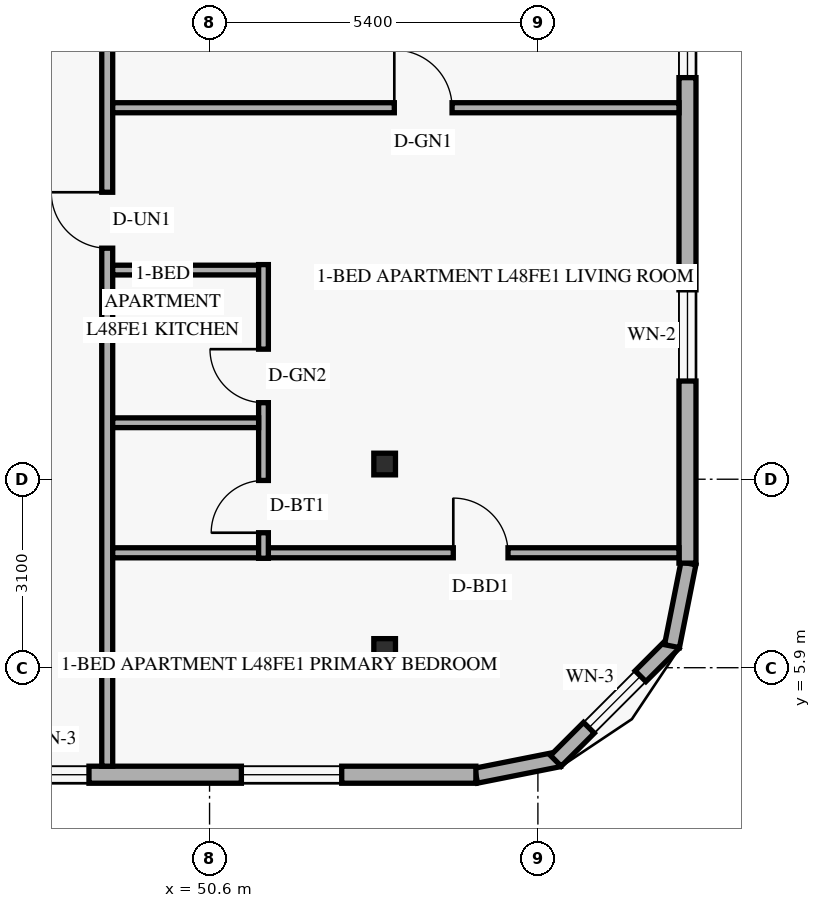
"""IFC4 building model, lengths in metres.
Left out: names, types, materials, properties, quantities, classifications, styles, units other than length and angle.
Written with IfcOpenShell. Run it as: python <this file> out.ifc"""

import sys

from ifc_helpers import new_model, si_unit, direction, frame, frame_2d, origin, origin_2d, place, context, subcontext, project, spatial, rectangle, hollow_rectangle, extrude, element, fill, save


model = new_model("IFC4")
c1 = context("Model", 3, precision=1e-05, world=origin(), true_north=direction((0.0, 1.0)))
c2 = subcontext(c1, "Body", "Model", "MODEL_VIEW")
j1 = project(units=[si_unit("LENGTHUNIT", "METRE"), si_unit("PLANEANGLEUNIT", "RADIAN")], contexts=[c1])
p1 = place(None, origin())
s1 = spatial("IfcSite", under=j1, at=p1, CompositionType="ELEMENT")
p2 = place(p1, origin())
s2 = spatial("IfcBuilding", under=s1, at=p2, CompositionType="ELEMENT")
p3 = place(p2, frame((0.0, 0.0, 184.8)))
s3 = spatial("IfcBuildingStorey", under=s2, at=p3, CompositionType="ELEMENT", Elevation=184.8)
for number, where, z_axis, x_axis in (
    (1, (53.375, 6.2, 0.0), (0.058, 0.0, 0.998), (0.0, 1.0, 0.0)),
    (2, (53.375, 9.25, 0.0), (0.058, 0.0, 0.998), (0.0, 1.0, 0.0)),
):
    element("IfcColumn", number, at=place(p3, frame(where, z_axis=z_axis, x_axis=x_axis)), inside=s3, PredefinedType="COLUMN", context=c2, shape_type="SweptSolid", body=[
        extrude(hollow_rectangle(XDim=0.356, YDim=0.356, WallThickness=0.016, at=origin_2d()), origin(), (0.0, 0.0, 1.0), 3.606),
    ])
p4 = place(p3, frame((54.983, 4.124, 0.0), z_axis=(0.0, 0.0, 1.0), x_axis=(0.980809899341, 0.19496651342, 0.0)))
e3 = element("IfcWall", 3, at=p4, inside=s3, PredefinedType="SOLIDWALL", context=c2, shape_type="SweptSolid", body=[
    extrude(rectangle(XDim=1.389, YDim=0.25, at=frame_2d((0.694, 0.0))), origin(), (0.0, 0.0, 1.0), 3.36),
])
p5 = place(p3, frame((56.295, 4.368, 0.0), z_axis=(0.0, 0.0, 1.0), x_axis=(0.707106781187, 0.707106781187, 0.0)))
e4 = element("IfcWall", 4, at=p5, inside=s3, PredefinedType="SOLIDWALL", context=c2, shape_type="SweptSolid", body=[
    extrude(rectangle(XDim=2.739, YDim=0.25, at=frame_2d((1.37, 0.0))), origin(), (0.0, 0.0, 1.0), 3.36),
])
p6 = place(p5, frame((0.77, 0.0, 0.85)))
e5 = element("IfcOpeningElement", 5, at=p6, cuts=e4, PredefinedType="OPENING", context=c2, shape_type="SweptSolid", body=[
    extrude(rectangle(XDim=1.2, YDim=1.5, at=frame_2d((0.6, 0.75))), frame((0.0, 0.135, 0.0), z_axis=(0.0, -1.0, 0.0), x_axis=(1.0, 0.0, 0.0)), (0.0, 0.0, 1.0), 0.27),
])
p7 = place(p3, frame((58.205, 6.254, 0.0), z_axis=(0.0, 0.0, 1.0), x_axis=(0.19496651342, 0.980809899341, 0.0)))
e6 = element("IfcWall", 6, at=p7, inside=s3, PredefinedType="SOLIDWALL", context=c2, shape_type="SweptSolid", body=[
    extrude(rectangle(XDim=1.389, YDim=0.25, at=frame_2d((0.694, 0.0))), origin(), (0.0, 0.0, 1.0), 3.36),
])
p8 = place(p3, frame((21.22, 4.14, 0.0), z_axis=(0.0, 0.0, 1.0), x_axis=(1.0, 0.0, 0.0)))
e7 = element("IfcWall", 7, at=p8, inside=s3, PredefinedType="SOLIDWALL", context=c2, shape_type="SweptSolid", body=[
    extrude(rectangle(XDim=33.76, YDim=0.28, at=frame_2d((16.88, 0.0))), origin(), (0.0, 0.0, 1.0), 3.36),
])
p9 = place(p8, frame((2.33, 0.0, 0.85)))
e8 = element("IfcOpeningElement", 8, at=p9, cuts=e7, PredefinedType="OPENING", context=c2, shape_type="SweptSolid", body=[
    extrude(rectangle(XDim=1.65, YDim=1.6, at=frame_2d((0.825, 0.8))), frame((0.0, 0.15, 0.0), z_axis=(0.0, -1.0, 0.0), x_axis=(1.0, 0.0, 0.0)), (0.0, 0.0, 1.0), 0.3),
])
p10 = place(p8, frame((9.215, 0.0, 0.85)))
e9 = element("IfcOpeningElement", 9, at=p10, cuts=e7, PredefinedType="OPENING", context=c2, shape_type="SweptSolid", body=[
    extrude(rectangle(XDim=1.65, YDim=1.6, at=frame_2d((0.825, 0.8))), frame((0.0, 0.15, 0.0), z_axis=(0.0, -1.0, 0.0), x_axis=(1.0, 0.0, 0.0)), (0.0, 0.0, 1.0), 0.3),
])
p11 = place(p8, frame((14.64, 0.0, 0.85)))
e10 = element("IfcOpeningElement", 10, at=p11, cuts=e7, PredefinedType="OPENING", context=c2, shape_type="SweptSolid", body=[
    extrude(rectangle(XDim=1.65, YDim=1.6, at=frame_2d((0.825, 0.8))), frame((0.0, 0.15, 0.0), z_axis=(0.0, -1.0, 0.0), x_axis=(1.0, 0.0, 0.0)), (0.0, 0.0, 1.0), 0.3),
])
p12 = place(p8, frame((20.489, 0.0, 0.85)))
e11 = element("IfcOpeningElement", 11, at=p12, cuts=e7, PredefinedType="OPENING", context=c2, shape_type="SweptSolid", body=[
    extrude(rectangle(XDim=1.65, YDim=1.6, at=frame_2d((0.825, 0.8))), frame((0.0, 0.15, 0.0), z_axis=(0.0, -1.0, 0.0), x_axis=(1.0, 0.0, 0.0)), (0.0, 0.0, 1.0), 0.3),
])
p13 = place(p8, frame((26.197, 0.0, 0.85)))
e12 = element("IfcOpeningElement", 12, at=p13, cuts=e7, PredefinedType="OPENING", context=c2, shape_type="SweptSolid", body=[
    extrude(rectangle(XDim=1.2, YDim=1.5, at=frame_2d((0.6, 0.75))), frame((0.0, 0.15, 0.0), z_axis=(0.0, -1.0, 0.0), x_axis=(1.0, 0.0, 0.0)), (0.0, 0.0, 1.0), 0.3),
])
p14 = place(p8, frame((29.904, 0.0, 0.85)))
e13 = element("IfcOpeningElement", 13, at=p14, cuts=e7, PredefinedType="OPENING", context=c2, shape_type="SweptSolid", body=[
    extrude(rectangle(XDim=1.65, YDim=1.6, at=frame_2d((0.825, 0.8))), frame((0.0, 0.15, 0.0), z_axis=(0.0, -1.0, 0.0), x_axis=(1.0, 0.0, 0.0)), (0.0, 0.0, 1.0), 0.3),
])
p15 = place(p3, frame((58.46, 7.62, 0.0), z_axis=(0.0, 0.0, 1.0), x_axis=(0.0, 1.0, 0.0)))
e14 = element("IfcWall", 14, at=p15, inside=s3, PredefinedType="SOLIDWALL", context=c2, shape_type="SweptSolid", body=[
    extrude(rectangle(XDim=12.72, YDim=0.28, at=frame_2d((6.36, 0.0))), origin(), (0.0, 0.0, 1.0), 3.36),
])
p16 = place(p15, frame((2.995, 0.0, 0.85)))
e15 = element("IfcOpeningElement", 15, at=p16, cuts=e14, PredefinedType="OPENING", context=c2, shape_type="SweptSolid", body=[
    extrude(rectangle(XDim=1.5, YDim=1.55, at=frame_2d((0.75, 0.775))), frame((0.0, 0.15, 0.0), z_axis=(0.0, -1.0, 0.0), x_axis=(1.0, 0.0, 0.0)), (0.0, 0.0, 1.0), 0.3),
])
p17 = place(p15, frame((7.985, 0.0, 0.85)))
e16 = element("IfcOpeningElement", 16, at=p17, cuts=e14, PredefinedType="OPENING", context=c2, shape_type="SweptSolid", body=[
    extrude(rectangle(XDim=1.5, YDim=1.55, at=frame_2d((0.75, 0.775))), frame((0.0, 0.15, 0.0), z_axis=(0.0, -1.0, 0.0), x_axis=(1.0, 0.0, 0.0)), (0.0, 0.0, 1.0), 0.3),
])
p18 = place(p15, frame((10.6, 0.0, 0.85)))
e17 = element("IfcOpeningElement", 17, at=p18, cuts=e14, PredefinedType="OPENING", context=c2, shape_type="SweptSolid", body=[
    extrude(rectangle(XDim=1.5, YDim=1.55, at=frame_2d((0.75, 0.775))), frame((0.0, 0.15, 0.0), z_axis=(0.0, -1.0, 0.0), x_axis=(1.0, 0.0, 0.0)), (0.0, 0.0, 1.0), 0.3),
])
p19 = place(p3, frame((48.917, 4.28, 0.0), z_axis=(0.0, 0.0, 1.0), x_axis=(0.0, 1.0, 0.0)))
e18 = element("IfcWall", 18, at=p19, inside=s3, PredefinedType="STANDARD", context=c2, shape_type="SweptSolid", body=[
    extrude(rectangle(XDim=39.44, YDim=0.18, at=frame_2d((19.72, 0.0))), origin(), (0.0, 0.0, 1.0), 2.73),
])
p20 = place(p19, frame((8.52, 0.0, 0.0)))
e19 = element("IfcOpeningElement", 19, at=p20, cuts=e18, PredefinedType="OPENING", context=c2, shape_type="SweptSolid", body=[
    extrude(rectangle(XDim=0.92, YDim=2.15, at=frame_2d((0.46, 1.075))), frame((0.0, 0.1, 0.0), z_axis=(0.0, -1.0, 0.0), x_axis=(1.0, 0.0, 0.0)), (0.0, 0.0, 1.0), 0.2),
])
p21 = place(p19, frame((17.302, 0.0, 0.0)))
e20 = element("IfcOpeningElement", 20, at=p21, cuts=e18, PredefinedType="OPENING", context=c2, shape_type="SweptSolid", body=[
    extrude(rectangle(XDim=0.92, YDim=2.15, at=frame_2d((0.46, 1.075))), frame((0.0, 0.1, 0.0), z_axis=(0.0, -1.0, 0.0), x_axis=(1.0, 0.0, 0.0)), (0.0, 0.0, 1.0), 0.2),
])
p22 = place(p19, frame((29.923, 0.0, 0.0)))
e21 = element("IfcOpeningElement", 21, at=p22, cuts=e18, PredefinedType="OPENING", context=c2, shape_type="SweptSolid", body=[
    extrude(rectangle(XDim=0.92, YDim=2.15, at=frame_2d((0.46, 1.075))), frame((0.0, 0.1, 0.0), z_axis=(0.0, -1.0, 0.0), x_axis=(1.0, 0.0, 0.0)), (0.0, 0.0, 1.0), 0.2),
])
p23 = place(p3, frame((49.007, 7.79, 0.0), z_axis=(0.0, 0.0, 1.0), x_axis=(1.0, 0.0, 0.0)))
e22 = element("IfcWall", 22, at=p23, inside=s3, PredefinedType="PARTITIONING", context=c2, shape_type="SweptSolid", body=[
    extrude(rectangle(XDim=9.313, YDim=0.165, at=frame_2d((4.656, 0.0))), origin(), (0.0, 0.0, 1.0), 2.879),
])
p24 = place(p23, frame((5.602, 0.0, 0.0)))
e23 = element("IfcOpeningElement", 23, at=p24, cuts=e22, PredefinedType="OPENING", context=c2, shape_type="SweptSolid", body=[
    extrude(rectangle(XDim=0.9, YDim=2.14, at=frame_2d((0.45, 1.07))), frame((0.0, 0.093, 0.0), z_axis=(0.0, -1.0, 0.0), x_axis=(1.0, 0.0, 0.0)), (0.0, 0.0, 1.0), 0.185),
])
p25 = place(p3, frame((49.007, 12.44, 0.0), z_axis=(0.0, 0.0, 1.0), x_axis=(1.0, 0.0, 0.0)))
e24 = element("IfcWall", 24, at=p25, inside=s3, PredefinedType="PLUMBINGWALL", context=c2, shape_type="SweptSolid", body=[
    extrude(rectangle(XDim=2.56, YDim=0.16, at=frame_2d((1.28, 0.0))), origin(), (0.0, 0.0, 1.0), 3.36),
])
p26 = place(p3, frame((51.487, 7.7, 0.0), z_axis=(0.0, 0.0, 1.0), x_axis=(0.0, 1.0, 0.0)))
e25 = element("IfcWall", 25, at=p26, inside=s3, PredefinedType="PLUMBINGWALL", context=c2, shape_type="SweptSolid", body=[
    extrude(rectangle(XDim=4.83, YDim=0.16, at=frame_2d((2.415, 0.0))), origin(), (0.0, 0.0, 1.0), 2.73),
])
p27 = place(p26, frame((0.42, 0.0, 0.0)))
e26 = element("IfcOpeningElement", 26, at=p27, cuts=e25, PredefinedType="OPENING", context=c2, shape_type="SweptSolid", body=[
    extrude(rectangle(XDim=0.86, YDim=2.12, at=frame_2d((0.43, 1.06))), frame((0.0, 0.09, 0.0), z_axis=(0.0, -1.0, 0.0), x_axis=(1.0, 0.0, 0.0)), (0.0, 0.0, 1.0), 0.18),
])
p28 = place(p26, frame((2.559, 0.0, 0.0)))
e27 = element("IfcOpeningElement", 27, at=p28, cuts=e25, PredefinedType="OPENING", context=c2, shape_type="SweptSolid", body=[
    extrude(rectangle(XDim=0.88, YDim=2.12, at=frame_2d((0.44, 1.06))), frame((0.0, 0.09, 0.0), z_axis=(0.0, -1.0, 0.0), x_axis=(1.0, 0.0, 0.0)), (0.0, 0.0, 1.0), 0.18),
])
p29 = place(p3, frame((49.007, 9.929, 0.0), z_axis=(0.0, 0.0, 1.0), x_axis=(1.0, 0.0, 0.0)))
e28 = element("IfcWall", 28, at=p29, inside=s3, PredefinedType="PLUMBINGWALL", context=c2, shape_type="SweptSolid", body=[
    extrude(rectangle(XDim=2.4, YDim=0.16, at=frame_2d((1.2, 0.0))), origin(), (0.0, 0.0, 1.0), 3.36),
])
p30 = place(p3, frame((49.007, 15.11, 0.0), z_axis=(0.0, 0.0, 1.0), x_axis=(1.0, 0.0, 0.0)))
e29 = element("IfcWall", 29, at=p30, inside=s3, PredefinedType="PARTITIONING", context=c2, shape_type="SweptSolid", body=[
    extrude(rectangle(XDim=9.313, YDim=0.165, at=frame_2d((4.656, 0.0))), origin(), (0.0, 0.0, 1.0), 2.879),
])
p31 = place(p30, frame((4.632, 0.0, 0.0)))
e30 = element("IfcOpeningElement", 30, at=p31, cuts=e29, PredefinedType="OPENING", context=c2, shape_type="SweptSolid", body=[
    extrude(rectangle(XDim=0.95, YDim=2.15, at=frame_2d((0.475, 1.075))), frame((0.0, 0.093, 0.0), z_axis=(0.0, -1.0, 0.0), x_axis=(1.0, 0.0, 0.0)), (0.0, 0.0, 1.0), 0.185),
])
p32 = place(p6, origin())
e31 = element("IfcWindow", 31, at=p32, inside=s3, PartitioningType="SINGLE_PANEL", PredefinedType="WINDOW", context=c2, shape_type="SweptSolid", body=[
    extrude(rectangle(XDim=1.2, YDim=1.5, at=frame_2d((0.6, 0.75))), frame((0.0, 0.03, 0.0), z_axis=(0.0, -1.0, 0.0), x_axis=(1.0, 0.0, 0.0)), (0.0, 0.0, 1.0), 0.06),
])
fill(e5, e31)
p33 = place(p13, origin())
e32 = element("IfcWindow", 32, at=p33, inside=s3, PartitioningType="SINGLE_PANEL", PredefinedType="WINDOW", context=c2, shape_type="SweptSolid", body=[
    extrude(rectangle(XDim=1.2, YDim=1.5, at=frame_2d((0.6, 0.75))), frame((0.0, 0.03, 0.0), z_axis=(0.0, -1.0, 0.0), x_axis=(1.0, 0.0, 0.0)), (0.0, 0.0, 1.0), 0.06),
])
fill(e12, e32)
p34 = place(p14, origin())
e33 = element("IfcWindow", 33, at=p34, inside=s3, PartitioningType="SINGLE_PANEL", PredefinedType="WINDOW", context=c2, shape_type="SweptSolid", body=[
    extrude(rectangle(XDim=1.65, YDim=1.6, at=frame_2d((0.825, 0.8))), frame((0.0, 0.03, 0.0), z_axis=(0.0, -1.0, 0.0), x_axis=(1.0, 0.0, 0.0)), (0.0, 0.0, 1.0), 0.06),
])
fill(e13, e33)
p35 = place(p16, origin())
e34 = element("IfcWindow", 34, at=p35, inside=s3, PartitioningType="SINGLE_PANEL", PredefinedType="WINDOW", context=c2, shape_type="SweptSolid", body=[
    extrude(rectangle(XDim=1.5, YDim=1.55, at=frame_2d((0.75, 0.775))), frame((0.0, 0.03, 0.0), z_axis=(0.0, -1.0, 0.0), x_axis=(1.0, 0.0, 0.0)), (0.0, 0.0, 1.0), 0.06),
])
fill(e15, e34)
p36 = place(p17, origin())
e35 = element("IfcWindow", 35, at=p36, inside=s3, PartitioningType="SINGLE_PANEL", PredefinedType="WINDOW", context=c2, shape_type="SweptSolid", body=[
    extrude(rectangle(XDim=1.5, YDim=1.55, at=frame_2d((0.75, 0.775))), frame((0.0, 0.03, 0.0), z_axis=(0.0, -1.0, 0.0), x_axis=(1.0, 0.0, 0.0)), (0.0, 0.0, 1.0), 0.06),
])
fill(e16, e35)
p37 = place(p31, origin())
e36 = element("IfcDoor", 36, at=p37, inside=s3, OperationType="SINGLE_SWING_LEFT", PredefinedType="DOOR", context=c2, shape_type="SweptSolid", body=[
    extrude(rectangle(XDim=0.95, YDim=2.15, at=frame_2d((0.475, 1.075))), frame((0.0, 0.025, 0.0), z_axis=(0.0, -1.0, 0.0), x_axis=(1.0, 0.0, 0.0)), (0.0, 0.0, 1.0), 0.05),
])
fill(e30, e36)
p38 = place(p20, origin())
e37 = element("IfcDoor", 37, at=p38, inside=s3, OperationType="SINGLE_SWING_RIGHT", PredefinedType="DOOR", context=c2, shape_type="SweptSolid", body=[
    extrude(rectangle(XDim=0.92, YDim=2.15, at=frame_2d((0.46, 1.075))), frame((0.0, 0.025, 0.0), z_axis=(0.0, -1.0, 0.0), x_axis=(1.0, 0.0, 0.0)), (0.0, 0.0, 1.0), 0.05),
])
fill(e19, e37)
p39 = place(p27, origin())
e38 = element("IfcDoor", 38, at=p39, inside=s3, OperationType="SINGLE_SWING_LEFT", PredefinedType="DOOR", context=c2, shape_type="SweptSolid", body=[
    extrude(rectangle(XDim=0.86, YDim=2.12, at=frame_2d((0.43, 1.06))), frame((0.0, 0.025, 0.0), z_axis=(0.0, -1.0, 0.0), x_axis=(1.0, 0.0, 0.0)), (0.0, 0.0, 1.0), 0.05),
])
fill(e26, e38)
p40 = place(p28, origin())
e39 = element("IfcDoor", 39, at=p40, inside=s3, OperationType="SINGLE_SWING_RIGHT", PredefinedType="DOOR", context=c2, shape_type="SweptSolid", body=[
    extrude(rectangle(XDim=0.88, YDim=2.12, at=frame_2d((0.44, 1.06))), frame((0.0, 0.025, 0.0), z_axis=(0.0, -1.0, 0.0), x_axis=(1.0, 0.0, 0.0)), (0.0, 0.0, 1.0), 0.05),
])
fill(e27, e39)
p41 = place(p24, origin())
e40 = element("IfcDoor", 40, at=p41, inside=s3, OperationType="SINGLE_SWING_LEFT", PredefinedType="DOOR", context=c2, shape_type="SweptSolid", body=[
    extrude(rectangle(XDim=0.9, YDim=2.14, at=frame_2d((0.45, 1.07))), frame((0.0, 0.025, 0.0), z_axis=(0.0, -1.0, 0.0), x_axis=(1.0, 0.0, 0.0)), (0.0, 0.0, 1.0), 0.05),
])
fill(e23, e40)
save(model, sys.argv[1])
